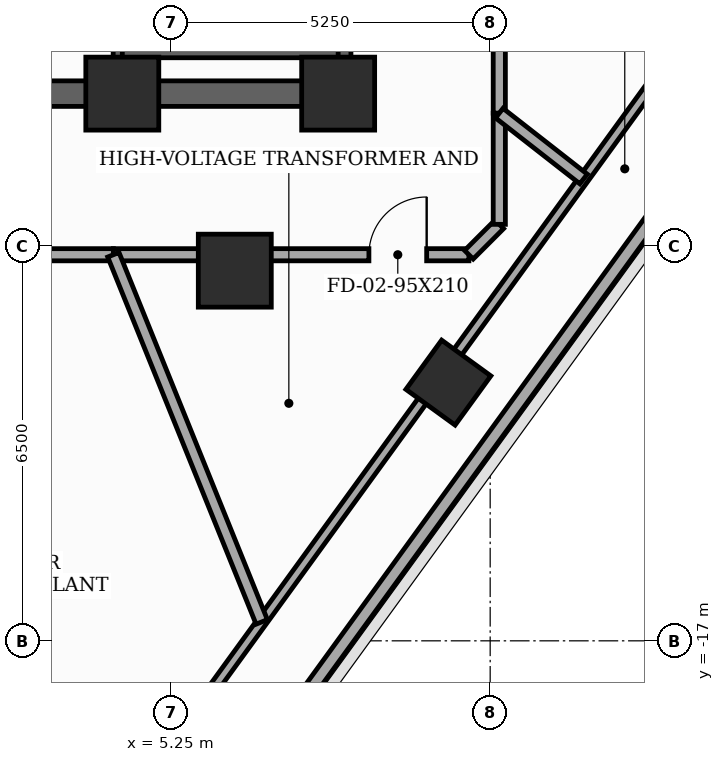
"""IFC4 building model, lengths in metres.
Left out: names, types, materials, properties, quantities, classifications, styles, units other than length and angle.
Written with IfcOpenShell. Run it as: python <this file> out.ifc"""

import sys

from ifc_helpers import new_model, si_unit, direction, frame, frame_2d, origin, origin_2d, place, context, subcontext, project, spatial, rectangle, extrude, element, fill, save


model = new_model("IFC4")
c1 = context("Model", 3, precision=1e-05, world=origin(), true_north=direction((0.0, 1.0)))
c2 = subcontext(c1, "Body", "Model", "MODEL_VIEW")
j1 = project(units=[si_unit("LENGTHUNIT", "METRE"), si_unit("PLANEANGLEUNIT", "RADIAN")], contexts=[c1])
p1 = place(None, origin())
s1 = spatial("IfcSite", under=j1, at=p1, CompositionType="ELEMENT")
p2 = place(p1, origin())
s2 = spatial("IfcBuilding", under=s1, at=p2, CompositionType="ELEMENT")
p3 = place(p2, frame((0.0, 0.0, 213.8)))
s3 = spatial("IfcBuildingStorey", under=s2, at=p3, CompositionType="ELEMENT", Elevation=213.8)
for number, where, z_axis, x_axis in (
    (1, (4.45, -8.0, 0.0), (0.0, 0.0, 1.0), (1.0, 0.0, 0.0)),
    (2, (8.0, -8.0, 0.0), (0.0, 0.0, 1.0), (1.0, 0.0, 0.0)),
    (3, (6.3, -10.912, 0.0), (0.0, 0.0, 1.0), (1.0, 0.0, 0.0)),
):
    element("IfcColumn", number, at=place(p3, frame(where, z_axis=z_axis, x_axis=x_axis)), inside=s3, PredefinedType="COLUMN", context=c2, shape_type="SweptSolid", body=[
        extrude(rectangle(XDim=1.2, YDim=1.2, at=origin_2d()), origin(), (0.0, 0.0, 1.0), 5.1),
    ])
p4 = place(p3, frame((9.812, -12.753, 0.0), z_axis=(0.0, 0.0, 1.0), x_axis=(0.587785252292, 0.809016994375, 0.0)))
e4 = element("IfcColumn", 4, at=p4, inside=s3, PredefinedType="COLUMN", context=c2, shape_type="SweptSolid", body=[
    extrude(rectangle(XDim=1.0, YDim=1.0, at=origin_2d()), origin(), (0.0, 0.0, 1.0), 5.1),
])
p5 = place(p3, frame((0.029, -28.142, 0.0), z_axis=(0.0, 0.0, 1.0), x_axis=(0.587783673123, 0.809018141706, 0.0)))
e5 = element("IfcWall", 5, at=p5, inside=s3, PredefinedType="SOLIDWALL", context=c2, shape_type="SweptSolid", body=[
    extrude(rectangle(XDim=45.5, YDim=0.22, at=frame_2d((22.75, 0.0))), origin(), (0.0, 0.0, 1.0), 4.4),
])
p6 = place(p3, frame((8.0, -8.0, 0.0), z_axis=(0.0, 0.0, 1.0), x_axis=(0.0, 1.0, 0.0)))
e6 = element("IfcWall", 6, at=p6, inside=s3, PredefinedType="SHEAR", context=c2, shape_type="SweptSolid", body=[
    extrude(rectangle(XDim=16.0, YDim=0.42, at=frame_2d((8.0, 0.0))), origin(), (0.0, 0.0, 1.0), 4.9),
])
p7 = place(p6, frame((9.6, 0.0, 0.0)))
e7 = element("IfcOpeningElement", 7, at=p7, cuts=e6, PredefinedType="OPENING", context=c2, shape_type="SweptSolid", body=[
    extrude(rectangle(XDim=1.05, YDim=2.15, at=frame_2d((0.525, 1.075))), frame((0.0, 0.22, 0.0), z_axis=(0.0, -1.0, 0.0), x_axis=(1.0, 0.0, 0.0)), (0.0, 0.0, 1.0), 0.44),
])
p8 = place(p6, frame((14.389, 0.0, 0.0)))
e8 = element("IfcOpeningElement", 8, at=p8, cuts=e6, PredefinedType="OPENING", context=c2, shape_type="SweptSolid", body=[
    extrude(rectangle(XDim=0.85, YDim=2.02, at=frame_2d((0.425, 1.01))), frame((0.0, 0.22, 0.0), z_axis=(0.0, -1.0, 0.0), x_axis=(1.0, 0.0, 0.0)), (0.0, 0.0, 1.0), 0.44),
])
p9 = place(p3, frame((-8.0, -8.0, 0.0), z_axis=(0.0, 0.0, 1.0), x_axis=(1.0, 0.0, 0.0)))
e9 = element("IfcWall", 9, at=p9, inside=s3, PredefinedType="SHEAR", context=c2, shape_type="SweptSolid", body=[
    extrude(rectangle(XDim=16.0, YDim=0.42, at=frame_2d((8.0, 0.0))), origin(), (0.0, 0.0, 1.0), 4.9),
])
p10 = place(p9, frame((7.52, 0.0, 0.0)))
e10 = element("IfcOpeningElement", 10, at=p10, cuts=e9, PredefinedType="OPENING", context=c2, shape_type="SweptSolid", body=[
    extrude(rectangle(XDim=0.95, YDim=2.1, at=frame_2d((0.475, 1.05))), frame((0.0, 0.22, 0.0), z_axis=(0.0, -1.0, 0.0), x_axis=(1.0, 0.0, 0.0)), (0.0, 0.0, 1.0), 0.44),
])
p11 = place(p3, frame((4.45, -7.79, 0.0), z_axis=(0.0, 0.0, 1.0), x_axis=(0.0, 1.0, 0.0)))
e11 = element("IfcWall", 11, at=p11, inside=s3, PredefinedType="SHEAR", context=c2, shape_type="SweptSolid", body=[
    extrude(rectangle(XDim=15.58, YDim=0.3, at=frame_2d((7.79, 0.0))), origin(), (0.0, 0.0, 1.0), 4.9),
])
p12 = place(p3, frame((4.45, -7.26, 0.0), z_axis=(0.0, 0.0, 1.0), x_axis=(1.0, 0.0, 0.0)))
e12 = element("IfcWall", 12, at=p12, inside=s3, PredefinedType="SHEAR", context=c2, shape_type="SweptSolid", body=[
    extrude(rectangle(XDim=3.55, YDim=0.3, at=frame_2d((1.775, 0.0))), origin(), (0.0, 0.0, 1.0), 4.9),
])
p13 = place(p3, frame((25.612, 9.281, 0.0), z_axis=(0.0, 0.0, 1.0), x_axis=(-0.587784319349, -0.809017672197, 0.0)))
e13 = element("IfcWall", 13, at=p13, inside=s3, PredefinedType="SOLIDWALL", context=c2, shape_type="SweptSolid", body=[
    extrude(rectangle(XDim=45.126, YDim=0.16, at=frame_2d((22.563, 0.0))), origin(), (0.0, 0.0, 1.0), 3.485),
])
p14 = place(p3, frame((-1.497, -10.65, 0.0), z_axis=(0.0, 0.0, 1.0), x_axis=(1.0, 0.0, 0.0)))
e14 = element("IfcWall", 14, at=p14, inside=s3, PredefinedType="SOLIDWALL", context=c2, shape_type="SweptSolid", body=[
    extrude(rectangle(XDim=5.8, YDim=0.2, at=frame_2d((2.9, 0.0))), origin(), (0.0, 0.0, 1.0), 4.9),
])
p15 = place(p14, frame((2.425, 0.0, 0.0)))
e15 = element("IfcOpeningElement", 15, at=p15, cuts=e14, PredefinedType="OPENING", context=c2, shape_type="SweptSolid", body=[
    extrude(rectangle(XDim=0.95, YDim=2.1, at=frame_2d((0.475, 1.05))), frame((0.0, 0.11, 0.0), z_axis=(0.0, -1.0, 0.0), x_axis=(1.0, 0.0, 0.0)), (0.0, 0.0, 1.0), 0.22),
])
p16 = place(p3, frame((4.303, -10.65, 0.0), z_axis=(0.0, 0.0, 1.0), x_axis=(1.0, 0.0, 0.0)))
e16 = element("IfcWall", 16, at=p16, inside=s3, PredefinedType="SOLIDWALL", context=c2, shape_type="SweptSolid", body=[
    extrude(rectangle(XDim=5.847, YDim=0.2, at=frame_2d((2.923, 0.0))), origin(), (0.0, 0.0, 1.0), 3.485),
])
p17 = place(p16, frame((4.203, 0.0, 0.0)))
e17 = element("IfcOpeningElement", 17, at=p17, cuts=e16, PredefinedType="OPENING", context=c2, shape_type="SweptSolid", body=[
    extrude(rectangle(XDim=0.95, YDim=2.1, at=frame_2d((0.475, 1.05))), frame((0.0, 0.11, 0.0), z_axis=(0.0, -1.0, 0.0), x_axis=(1.0, 0.0, 0.0)), (0.0, 0.0, 1.0), 0.22),
])
p18 = place(p3, frame((10.15, -10.65, 0.0), z_axis=(0.0, 0.0, 1.0), x_axis=(0.707106781187, 0.707106781187, 0.0)))
e18 = element("IfcWall", 18, at=p18, inside=s3, PredefinedType="SOLIDWALL", context=c2, shape_type="SweptSolid", body=[
    extrude(rectangle(XDim=0.707, YDim=0.2, at=frame_2d((0.354, 0.0))), origin(), (0.0, 0.0, 1.0), 4.9),
])
p19 = place(p3, frame((10.65, -10.15, 0.0), z_axis=(0.0, 0.0, 1.0), x_axis=(0.0, 1.0, 0.0)))
e19 = element("IfcWall", 19, at=p19, inside=s3, PredefinedType="SOLIDWALL", context=c2, shape_type="SweptSolid", body=[
    extrude(rectangle(XDim=1.829, YDim=0.2, at=frame_2d((0.915, 0.0))), origin(), (0.0, 0.0, 1.0), 4.9),
])
p20 = place(p3, frame((10.65, -8.321, 0.0), z_axis=(0.0, 0.0, 1.0), x_axis=(0.0, 1.0, 0.0)))
e20 = element("IfcWall", 20, at=p20, inside=s3, PredefinedType="SOLIDWALL", context=c2, shape_type="SweptSolid", body=[
    extrude(rectangle(XDim=6.824, YDim=0.2, at=frame_2d((3.412, 0.0))), origin(), (0.0, 0.0, 1.0), 4.285),
])
p21 = place(p20, frame((4.438, 0.0, 0.0)))
e21 = element("IfcOpeningElement", 21, at=p21, cuts=e20, PredefinedType="OPENING", context=c2, shape_type="SweptSolid", body=[
    extrude(rectangle(XDim=0.95, YDim=2.1, at=frame_2d((0.475, 1.05))), frame((0.0, 0.11, 0.0), z_axis=(0.0, -1.0, 0.0), x_axis=(1.0, 0.0, 0.0)), (0.0, 0.0, 1.0), 0.22),
])
p22 = place(p3, frame((6.743, -16.689, 0.0), z_axis=(0.0, 0.0, 1.0), x_axis=(-0.374606827928, 0.927183759818, 0.0)))
e22 = element("IfcWall", 22, at=p22, inside=s3, PredefinedType="SOLIDWALL", context=c2, shape_type="SweptSolid", body=[
    extrude(rectangle(XDim=6.513, YDim=0.2, at=frame_2d((3.257, 0.0))), origin(), (0.0, 0.0, 1.0), 3.485),
])
p23 = place(p3, frame((12.036, -9.404, 0.0), z_axis=(0.0, 0.0, 1.0), x_axis=(-0.78796755412, 0.615716764149, 0.0)))
e23 = element("IfcWall", 23, at=p23, inside=s3, PredefinedType="SOLIDWALL", context=c2, shape_type="SweptSolid", body=[
    extrude(rectangle(XDim=1.759, YDim=0.2, at=frame_2d((0.879, 0.0))), origin(), (0.0, 0.0, 1.0), 3.485),
])
p24 = place(p17, origin())
e24 = element("IfcDoor", 24, at=p24, inside=s3, OperationType="SINGLE_SWING_RIGHT", PredefinedType="DOOR", context=c2, shape_type="SweptSolid", body=[
    extrude(rectangle(XDim=0.95, YDim=2.1, at=frame_2d((0.475, 1.05))), frame((0.0, 0.025, 0.0), z_axis=(0.0, -1.0, 0.0), x_axis=(1.0, 0.0, 0.0)), (0.0, 0.0, 1.0), 0.05),
])
fill(e17, e24)
save(model, sys.argv[1])
